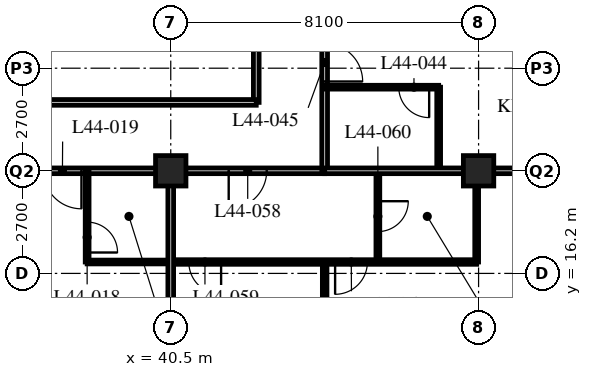
"""IFC4 building model, lengths in metres.
Left out: names, types, materials, properties, quantities, classifications, styles, units other than length and angle.
Written with IfcOpenShell. Run it as: python <this file> out.ifc"""

import sys

from ifc_helpers import new_model, si_unit, direction, frame, frame_2d, origin, origin_2d, place, context, subcontext, project, spatial, rectangle, hollow_rectangle, extrude, element, fill, save


model = new_model("IFC4")
c1 = context("Model", 3, precision=1e-05, world=origin(), true_north=direction((0.0, 1.0)))
c2 = subcontext(c1, "Body", "Model", "MODEL_VIEW")
j1 = project(units=[si_unit("LENGTHUNIT", "METRE"), si_unit("PLANEANGLEUNIT", "RADIAN")], contexts=[c1])
p1 = place(None, origin())
s1 = spatial("IfcSite", under=j1, at=p1, CompositionType="ELEMENT")
p2 = place(p1, origin())
s2 = spatial("IfcBuilding", under=s1, at=p2, CompositionType="ELEMENT")
p3 = place(p2, frame((0.0, 0.0, 174.0)))
s3 = spatial("IfcBuildingStorey", under=s2, at=p3, CompositionType="ELEMENT", Elevation=174.0)
for number, where, z_axis, x_axis in (
    (1, (40.5, 18.9, 0.0), (0.0, 0.0, 1.0), (1.0, 0.0, 0.0)),
    (2, (48.6, 18.9, 0.0), (0.0, 0.0, 1.0), (1.0, 0.0, 0.0)),
):
    element("IfcColumn", number, at=place(p3, frame(where, z_axis=z_axis, x_axis=x_axis)), inside=s3, PredefinedType="COLUMN", context=c2, shape_type="SweptSolid", body=[
        extrude(hollow_rectangle(XDim=0.8, YDim=0.8, WallThickness=0.08, at=origin_2d()), origin(), (0.0, 0.0, 1.0), 3.6),
    ])
p4 = place(p3, frame((12.15, 18.9, 0.0), z_axis=(0.0, 0.0, 1.0), x_axis=(1.0, 0.0, 0.0)))
e3 = element("IfcWall", 3, at=p4, inside=s3, PredefinedType="PARTITIONING", context=c2, shape_type="SweptSolid", body=[
    extrude(rectangle(XDim=32.4, YDim=0.15, at=frame_2d((16.2, 0.0))), origin(), (0.0, 0.0, 1.0), 2.778),
])
p5 = place(p4, frame((6.4, 0.0, 0.0)))
e4 = element("IfcOpeningElement", 4, at=p5, cuts=e3, PredefinedType="OPENING", context=c2, shape_type="SweptSolid", body=[
    extrude(rectangle(XDim=1.0, YDim=2.1, at=frame_2d((0.5, 1.05))), frame((0.0, 0.085, 0.0), z_axis=(0.0, -1.0, 0.0), x_axis=(1.0, 0.0, 0.0)), (0.0, 0.0, 1.0), 0.17),
])
p6 = place(p4, frame((8.8, 0.0, 0.0)))
e5 = element("IfcOpeningElement", 5, at=p6, cuts=e3, PredefinedType="OPENING", context=c2, shape_type="SweptSolid", body=[
    extrude(rectangle(XDim=1.0, YDim=2.1, at=frame_2d((0.5, 1.05))), frame((0.0, 0.085, 0.0), z_axis=(0.0, -1.0, 0.0), x_axis=(1.0, 0.0, 0.0)), (0.0, 0.0, 1.0), 0.17),
])
p7 = place(p4, frame((13.05, 0.0, 0.0)))
e6 = element("IfcOpeningElement", 6, at=p7, cuts=e3, PredefinedType="OPENING", context=c2, shape_type="SweptSolid", body=[
    extrude(rectangle(XDim=1.0, YDim=2.1, at=frame_2d((0.5, 1.05))), frame((0.0, 0.085, 0.0), z_axis=(0.0, -1.0, 0.0), x_axis=(1.0, 0.0, 0.0)), (0.0, 0.0, 1.0), 0.17),
])
p8 = place(p4, frame((22.6, 0.0, 0.0)))
e7 = element("IfcOpeningElement", 7, at=p8, cuts=e3, PredefinedType="OPENING", context=c2, shape_type="SweptSolid", body=[
    extrude(rectangle(XDim=1.0, YDim=2.1, at=frame_2d((0.5, 1.05))), frame((0.0, 0.085, 0.0), z_axis=(0.0, -1.0, 0.0), x_axis=(1.0, 0.0, 0.0)), (0.0, 0.0, 1.0), 0.17),
])
p9 = place(p4, frame((25.0, 0.0, 0.0)))
e8 = element("IfcOpeningElement", 8, at=p9, cuts=e3, PredefinedType="OPENING", context=c2, shape_type="SweptSolid", body=[
    extrude(rectangle(XDim=1.0, YDim=2.1, at=frame_2d((0.5, 1.05))), frame((0.0, 0.085, 0.0), z_axis=(0.0, -1.0, 0.0), x_axis=(1.0, 0.0, 0.0)), (0.0, 0.0, 1.0), 0.17),
])
p10 = place(p4, frame((1.525, 0.0, 0.0)))
e9 = element("IfcOpeningElement", 9, at=p10, cuts=e3, PredefinedType="OPENING", context=c2, shape_type="SweptSolid", body=[
    extrude(rectangle(XDim=1.0, YDim=2.1, at=frame_2d((0.5, 1.05))), frame((0.0, 0.085, 0.0), z_axis=(0.0, -1.0, 0.0), x_axis=(1.0, 0.0, 0.0)), (0.0, 0.0, 1.0), 0.17),
])
p11 = place(p4, frame((29.875, 0.0, 0.0)))
e10 = element("IfcOpeningElement", 10, at=p11, cuts=e3, PredefinedType="OPENING", context=c2, shape_type="SweptSolid", body=[
    extrude(rectangle(XDim=1.0, YDim=2.1, at=frame_2d((0.5, 1.05))), frame((0.0, 0.085, 0.0), z_axis=(0.0, -1.0, 0.0), x_axis=(1.0, 0.0, 0.0)), (0.0, 0.0, 1.0), 0.17),
])
p12 = place(p3, frame((44.55, 18.9, 0.0), z_axis=(0.0, 0.0, 1.0), x_axis=(0.0, 1.0, 0.0)))
e11 = element("IfcWall", 11, at=p12, inside=s3, PredefinedType="PARTITIONING", context=c2, shape_type="SweptSolid", body=[
    extrude(rectangle(XDim=24.3, YDim=0.15, at=frame_2d((12.15, 0.0))), origin(), (0.0, 0.0, 1.0), 3.39),
])
p13 = place(p12, frame((2.35, 0.0, 0.0)))
e12 = element("IfcOpeningElement", 12, at=p13, cuts=e11, PredefinedType="OPENING", context=c2, shape_type="SweptSolid", body=[
    extrude(rectangle(XDim=1.0, YDim=2.1, at=frame_2d((0.5, 1.05))), frame((0.0, 0.085, 0.0), z_axis=(0.0, -1.0, 0.0), x_axis=(1.0, 0.0, 0.0)), (0.0, 0.0, 1.0), 0.17),
])
p14 = place(p12, frame((4.45, 0.0, 0.0)))
e13 = element("IfcOpeningElement", 13, at=p14, cuts=e11, PredefinedType="OPENING", context=c2, shape_type="SweptSolid", body=[
    extrude(rectangle(XDim=1.0, YDim=2.1, at=frame_2d((0.5, 1.05))), frame((0.0, 0.085, 0.0), z_axis=(0.0, -1.0, 0.0), x_axis=(1.0, 0.0, 0.0)), (0.0, 0.0, 1.0), 0.17),
])
p15 = place(p12, frame((18.55, 0.0, 0.0)))
e14 = element("IfcOpeningElement", 14, at=p15, cuts=e11, PredefinedType="OPENING", context=c2, shape_type="SweptSolid", body=[
    extrude(rectangle(XDim=1.0, YDim=2.1, at=frame_2d((0.5, 1.05))), frame((0.0, 0.085, 0.0), z_axis=(0.0, -1.0, 0.0), x_axis=(1.0, 0.0, 0.0)), (0.0, 0.0, 1.0), 0.17),
])
p16 = place(p12, frame((22.6, 0.0, 0.0)))
e15 = element("IfcOpeningElement", 15, at=p16, cuts=e11, PredefinedType="OPENING", context=c2, shape_type="SweptSolid", body=[
    extrude(rectangle(XDim=1.0, YDim=2.1, at=frame_2d((0.5, 1.05))), frame((0.0, 0.085, 0.0), z_axis=(0.0, -1.0, 0.0), x_axis=(1.0, 0.0, 0.0)), (0.0, 0.0, 1.0), 0.17),
])
p17 = place(p3, frame((42.75, 20.7, 0.0), z_axis=(0.0, 0.0, 1.0), x_axis=(0.0, 1.0, 0.0)))
e16 = element("IfcWall", 16, at=p17, inside=s3, PredefinedType="PARTITIONING", context=c2, shape_type="SweptSolid", body=[
    extrude(rectangle(XDim=19.8, YDim=0.15, at=frame_2d((9.9, 0.0))), origin(), (0.0, 0.0, 1.0), 3.39),
])
p18 = place(p17, frame((7.15, 0.0, 0.0)))
e17 = element("IfcOpeningElement", 17, at=p18, cuts=e16, PredefinedType="OPENING", context=c2, shape_type="SweptSolid", body=[
    extrude(rectangle(XDim=1.0, YDim=2.1, at=frame_2d((0.5, 1.05))), frame((0.0, 0.085, 0.0), z_axis=(0.0, -1.0, 0.0), x_axis=(1.0, 0.0, 0.0)), (0.0, 0.0, 1.0), 0.17),
])
p19 = place(p17, frame((15.25, 0.0, 0.0)))
e18 = element("IfcOpeningElement", 18, at=p19, cuts=e16, PredefinedType="OPENING", context=c2, shape_type="SweptSolid", body=[
    extrude(rectangle(XDim=1.0, YDim=2.1, at=frame_2d((0.5, 1.05))), frame((0.0, 0.085, 0.0), z_axis=(0.0, -1.0, 0.0), x_axis=(1.0, 0.0, 0.0)), (0.0, 0.0, 1.0), 0.17),
])
p20 = place(p3, frame((29.56, 20.7, 0.0), z_axis=(0.0, 0.0, 1.0), x_axis=(1.0, 0.0, 0.0)))
e19 = element("IfcWall", 19, at=p20, inside=s3, PredefinedType="PARTITIONING", context=c2, shape_type="SweptSolid", body=[
    extrude(rectangle(XDim=13.19, YDim=0.15, at=frame_2d((6.595, 0.0))), origin(), (0.0, 0.0, 1.0), 3.39),
])
p21 = place(p20, frame((6.09, 0.0, 0.0)))
e20 = element("IfcOpeningElement", 20, at=p21, cuts=e19, PredefinedType="OPENING", context=c2, shape_type="SweptSolid", body=[
    extrude(rectangle(XDim=1.0, YDim=2.1, at=frame_2d((0.5, 1.05))), frame((0.0, 0.085, 0.0), z_axis=(0.0, -1.0, 0.0), x_axis=(1.0, 0.0, 0.0)), (0.0, 0.0, 1.0), 0.17),
])
p22 = place(p3, frame((38.3, 16.5, 0.0), z_axis=(0.0, 0.0, 1.0), x_axis=(1.0, 0.0, 0.0)))
e21 = element("IfcWall", 21, at=p22, inside=s3, PredefinedType="PARTITIONING", context=c2, shape_type="SweptSolid", body=[
    extrude(rectangle(XDim=2.2, YDim=0.1, at=frame_2d((1.1, 0.0))), origin(), (0.0, 0.0, 1.0), 3.39),
])
p23 = place(p3, frame((38.3, 18.9, 0.0), z_axis=(0.0, 0.0, 1.0), x_axis=(0.0, -1.0, 0.0)))
e22 = element("IfcWall", 22, at=p23, inside=s3, PredefinedType="PARTITIONING", context=c2, shape_type="SweptSolid", body=[
    extrude(rectangle(XDim=2.4, YDim=0.1, at=frame_2d((1.2, 0.0))), origin(), (0.0, 0.0, 1.0), 3.39),
])
p24 = place(p23, frame((1.35, 0.0, 0.0)))
e23 = element("IfcOpeningElement", 23, at=p24, cuts=e22, PredefinedType="OPENING", context=c2, shape_type="SweptSolid", body=[
    extrude(rectangle(XDim=0.8, YDim=2.1, at=frame_2d((0.4, 1.05))), frame((0.0, 0.06, 0.0), z_axis=(0.0, -1.0, 0.0), x_axis=(1.0, 0.0, 0.0)), (0.0, 0.0, 1.0), 0.12),
])
p25 = place(p3, frame((47.55, 18.9, 0.0), z_axis=(0.0, 0.0, 1.0), x_axis=(0.0, 1.0, 0.0)))
e24 = element("IfcWall", 24, at=p25, inside=s3, PredefinedType="PARTITIONING", context=c2, shape_type="SweptSolid", body=[
    extrude(rectangle(XDim=2.2, YDim=0.1, at=frame_2d((1.1, 0.0))), origin(), (0.0, 0.0, 1.0), 3.39),
])
p26 = place(p3, frame((44.55, 21.1, 0.0), z_axis=(0.0, 0.0, 1.0), x_axis=(1.0, 0.0, 0.0)))
e25 = element("IfcWall", 25, at=p26, inside=s3, PredefinedType="PARTITIONING", context=c2, shape_type="SweptSolid", body=[
    extrude(rectangle(XDim=3.0, YDim=0.1, at=frame_2d((1.5, 0.0))), origin(), (0.0, 0.0, 1.0), 3.39),
])
p27 = place(p26, frame((1.95, 0.0, 0.0)))
e26 = element("IfcOpeningElement", 26, at=p27, cuts=e25, PredefinedType="OPENING", context=c2, shape_type="SweptSolid", body=[
    extrude(rectangle(XDim=0.8, YDim=2.1, at=frame_2d((0.4, 1.05))), frame((0.0, 0.06, 0.0), z_axis=(0.0, -1.0, 0.0), x_axis=(1.0, 0.0, 0.0)), (0.0, 0.0, 1.0), 0.12),
])
p28 = place(p3, frame((40.5, 16.5, 0.0), z_axis=(0.0, 0.0, 1.0), x_axis=(1.0, 0.0, 0.0)))
e27 = element("IfcWall", 27, at=p28, inside=s3, PredefinedType="PARTITIONING", context=c2, shape_type="SweptSolid", body=[
    extrude(rectangle(XDim=8.05, YDim=0.12, at=frame_2d((4.025, 0.0))), origin(), (0.0, 0.0, 1.0), 3.39),
])
p29 = place(p28, frame((0.475, 0.0, 0.0)))
e28 = element("IfcOpeningElement", 28, at=p29, cuts=e27, PredefinedType="OPENING", context=c2, shape_type="SweptSolid", body=[
    extrude(rectangle(XDim=0.85, YDim=2.1, at=frame_2d((0.425, 1.05))), frame((0.0, 0.07, 0.0), z_axis=(0.0, -1.0, 0.0), x_axis=(1.0, 0.0, 0.0)), (0.0, 0.0, 1.0), 0.14),
])
p30 = place(p28, frame((4.325, 0.0, 0.0)))
e29 = element("IfcOpeningElement", 29, at=p30, cuts=e27, PredefinedType="OPENING", context=c2, shape_type="SweptSolid", body=[
    extrude(rectangle(XDim=0.85, YDim=2.1, at=frame_2d((0.425, 1.05))), frame((0.0, 0.07, 0.0), z_axis=(0.0, -1.0, 0.0), x_axis=(1.0, 0.0, 0.0)), (0.0, 0.0, 1.0), 0.14),
])
p31 = place(p3, frame((45.95, 18.9, 0.0), z_axis=(0.0, 0.0, 1.0), x_axis=(0.0, -1.0, 0.0)))
e30 = element("IfcWall", 30, at=p31, inside=s3, PredefinedType="PARTITIONING", context=c2, shape_type="SweptSolid", body=[
    extrude(rectangle(XDim=2.4, YDim=0.1, at=frame_2d((1.2, 0.0))), origin(), (0.0, 0.0, 1.0), 3.39),
])
p32 = place(p31, frame((0.8, 0.0, 0.0)))
e31 = element("IfcOpeningElement", 31, at=p32, cuts=e30, PredefinedType="OPENING", context=c2, shape_type="SweptSolid", body=[
    extrude(rectangle(XDim=0.8, YDim=2.1, at=frame_2d((0.4, 1.05))), frame((0.0, 0.06, 0.0), z_axis=(0.0, -1.0, 0.0), x_axis=(1.0, 0.0, 0.0)), (0.0, 0.0, 1.0), 0.12),
])
p33 = place(p3, frame((48.55, 18.9, 0.0), z_axis=(0.0, 0.0, 1.0), x_axis=(0.0, -1.0, 0.0)))
e32 = element("IfcWall", 32, at=p33, inside=s3, PredefinedType="PARTITIONING", context=c2, shape_type="SweptSolid", body=[
    extrude(rectangle(XDim=2.4, YDim=0.1, at=frame_2d((1.2, 0.0))), origin(), (0.0, 0.0, 1.0), 2.778),
])
p34 = place(p3, frame((44.55, 16.5, 0.0), z_axis=(0.0, 0.0, 1.0), x_axis=(0.0, -1.0, 0.0)))
e33 = element("IfcWall", 33, at=p34, inside=s3, PredefinedType="PARTITIONING", context=c2, shape_type="SweptSolid", body=[
    extrude(rectangle(XDim=5.4, YDim=0.12, at=frame_2d((2.7, 0.0))), origin(), (0.0, 0.0, 1.0), 3.39),
])
p35 = place(p3, frame((44.55, 18.9, 0.0), z_axis=(0.0, 0.0, 1.0), x_axis=(1.0, 0.0, 0.0)))
e34 = element("IfcWall", 34, at=p35, inside=s3, PredefinedType="PARTITIONING", context=c2, shape_type="SweptSolid", body=[
    extrude(rectangle(XDim=7.8, YDim=0.15, at=frame_2d((3.9, 0.0))), origin(), (0.0, 0.0, 1.0), 2.778),
])
p36 = place(p3, frame((40.5, 18.9, 0.0), z_axis=(0.0, 0.0, 1.0), x_axis=(0.0, -1.0, 0.0)))
e35 = element("IfcWall", 35, at=p36, inside=s3, PredefinedType="PARTITIONING", context=c2, shape_type="SweptSolid", body=[
    extrude(rectangle(XDim=7.8, YDim=0.15, at=frame_2d((3.9, 0.0))), origin(), (0.0, 0.0, 1.0), 2.778),
])
p37 = place(p24, origin())
e36 = element("IfcDoor", 36, at=p37, inside=s3, OperationType="SINGLE_SWING_RIGHT", PredefinedType="DOOR", context=c2, shape_type="SweptSolid", body=[
    extrude(rectangle(XDim=0.8, YDim=2.1, at=frame_2d((0.4, 1.05))), frame((0.0, 0.025, 0.0), z_axis=(0.0, -1.0, 0.0), x_axis=(1.0, 0.0, 0.0)), (0.0, 0.0, 1.0), 0.05),
])
fill(e23, e36)
p38 = place(p9, origin())
e37 = element("IfcDoor", 37, at=p38, inside=s3, OperationType="SINGLE_SWING_LEFT", PredefinedType="DOOR", context=c2, shape_type="SweptSolid", body=[
    extrude(rectangle(XDim=1.0, YDim=2.1, at=frame_2d((0.5, 1.05))), frame((0.0, 0.025, 0.0), z_axis=(0.0, -1.0, 0.0), x_axis=(1.0, 0.0, 0.0)), (0.0, 0.0, 1.0), 0.05),
])
fill(e8, e37)
p39 = place(p27, origin())
e38 = element("IfcDoor", 38, at=p39, inside=s3, OperationType="SINGLE_SWING_LEFT", PredefinedType="DOOR", context=c2, shape_type="SweptSolid", body=[
    extrude(rectangle(XDim=0.8, YDim=2.1, at=frame_2d((0.4, 1.05))), frame((0.0, 0.025, 0.0), z_axis=(0.0, -1.0, 0.0), x_axis=(1.0, 0.0, 0.0)), (0.0, 0.0, 1.0), 0.05),
])
fill(e26, e38)
p40 = place(p13, origin())
e39 = element("IfcDoor", 39, at=p40, inside=s3, OperationType="SINGLE_SWING_RIGHT", PredefinedType="DOOR", context=c2, shape_type="SweptSolid", body=[
    extrude(rectangle(XDim=1.0, YDim=2.1, at=frame_2d((0.5, 1.05))), frame((0.0, 0.025, 0.0), z_axis=(0.0, -1.0, 0.0), x_axis=(1.0, 0.0, 0.0)), (0.0, 0.0, 1.0), 0.05),
])
fill(e12, e39)
p41 = place(p11, origin())
e40 = element("IfcDoor", 40, at=p41, inside=s3, OperationType="SINGLE_SWING_RIGHT", PredefinedType="DOOR", context=c2, shape_type="SweptSolid", body=[
    extrude(rectangle(XDim=1.0, YDim=2.1, at=frame_2d((0.5, 1.05))), frame((0.0, 0.025, 0.0), z_axis=(0.0, -1.0, 0.0), x_axis=(1.0, 0.0, 0.0)), (0.0, 0.0, 1.0), 0.05),
])
fill(e10, e40)
p42 = place(p29, origin())
e41 = element("IfcDoor", 41, at=p42, inside=s3, OperationType="SINGLE_SWING_LEFT", PredefinedType="DOOR", context=c2, shape_type="SweptSolid", body=[
    extrude(rectangle(XDim=0.85, YDim=2.1, at=frame_2d((0.425, 1.05))), frame((0.0, 0.025, 0.0), z_axis=(0.0, -1.0, 0.0), x_axis=(1.0, 0.0, 0.0)), (0.0, 0.0, 1.0), 0.05),
])
fill(e28, e41)
p43 = place(p32, origin())
e42 = element("IfcDoor", 42, at=p43, inside=s3, OperationType="SINGLE_SWING_LEFT", PredefinedType="DOOR", context=c2, shape_type="SweptSolid", body=[
    extrude(rectangle(XDim=0.8, YDim=2.1, at=frame_2d((0.4, 1.05))), frame((0.0, 0.025, 0.0), z_axis=(0.0, -1.0, 0.0), x_axis=(1.0, 0.0, 0.0)), (0.0, 0.0, 1.0), 0.05),
])
fill(e31, e42)
p44 = place(p30, origin())
e43 = element("IfcDoor", 43, at=p44, inside=s3, OperationType="SINGLE_SWING_RIGHT", PredefinedType="DOOR", context=c2, shape_type="SweptSolid", body=[
    extrude(rectangle(XDim=0.85, YDim=2.1, at=frame_2d((0.425, 1.05))), frame((0.0, 0.025, 0.0), z_axis=(0.0, -1.0, 0.0), x_axis=(1.0, 0.0, 0.0)), (0.0, 0.0, 1.0), 0.05),
])
fill(e29, e43)
save(model, sys.argv[1])
